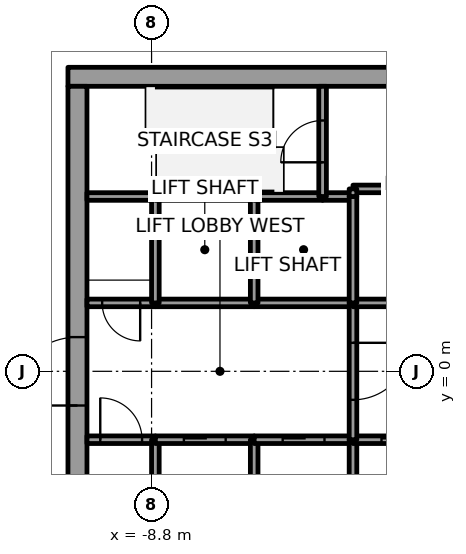
"""IFC4 building model, lengths in metres.
Left out: names, types, materials, properties, quantities, classifications, styles, units other than length and angle.
Written with IfcOpenShell. Run it as: python <this file> out.ifc"""

import sys

from ifc_helpers import new_model, si_unit, direction, frame, frame_2d, origin, place, context, subcontext, project, spatial, rectangle, extrude, element, fill, save


model = new_model("IFC4")
c1 = context("Model", 3, precision=1e-05, world=origin(), true_north=direction((0.0, 1.0)))
c2 = subcontext(c1, "Body", "Model", "MODEL_VIEW")
j1 = project(units=[si_unit("LENGTHUNIT", "METRE"), si_unit("PLANEANGLEUNIT", "RADIAN")], contexts=[c1])
p1 = place(None, origin())
s1 = spatial("IfcSite", under=j1, at=p1, CompositionType="ELEMENT")
p2 = place(p1, origin())
s2 = spatial("IfcBuilding", under=s1, at=p2, CompositionType="ELEMENT")
p3 = place(p2, frame((0.0, 0.0, 177.8)))
s3 = spatial("IfcBuildingStorey", under=s2, at=p3, CompositionType="ELEMENT", Elevation=177.8)
p4 = place(p3, frame((-11.0, 7.75, 0.0), z_axis=(0.0, 0.0, 1.0), x_axis=(1.0, 0.0, 0.0)))
e1 = element("IfcWall", 1, at=p4, inside=s3, PredefinedType="SHEAR", context=c2, shape_type="SweptSolid", body=[
    extrude(rectangle(XDim=22.0, YDim=0.5, at=frame_2d((11.0, 0.0))), origin(), (0.0, 0.0, 1.0), 4.0),
])
p5 = place(p4, frame((10.45, 0.0, 0.0)))
e2 = element("IfcOpeningElement", 2, at=p5, cuts=e1, PredefinedType="OPENING", context=c2, shape_type="SweptSolid", body=[
    extrude(rectangle(XDim=1.1, YDim=2.1, at=frame_2d((0.55, 1.05))), frame((0.0, 0.25, 0.0), z_axis=(0.0, -1.0, 0.0), x_axis=(1.0, 0.0, 0.0)), (0.0, 0.0, 1.0), 0.5),
])
p6 = place(p3, frame((-10.75, -7.5, 0.0), z_axis=(0.0, 0.0, 1.0), x_axis=(0.0, 1.0, 0.0)))
e3 = element("IfcWall", 3, at=p6, inside=s3, PredefinedType="SHEAR", context=c2, shape_type="SweptSolid", body=[
    extrude(rectangle(XDim=15.0, YDim=0.5, at=frame_2d((7.5, 0.0))), origin(), (0.0, 0.0, 1.0), 4.0),
])
p7 = place(p6, frame((6.6, 0.0, 0.0)))
e4 = element("IfcOpeningElement", 4, at=p7, cuts=e3, PredefinedType="OPENING", context=c2, shape_type="SweptSolid", body=[
    extrude(rectangle(XDim=1.8, YDim=2.1, at=frame_2d((0.9, 1.05))), frame((0.0, 0.25, 0.0), z_axis=(0.0, -1.0, 0.0), x_axis=(1.0, 0.0, 0.0)), (0.0, 0.0, 1.0), 0.5),
])
p8 = place(p3, frame((-10.5, -1.8, 0.0), z_axis=(0.0, 0.0, 1.0), x_axis=(1.0, 0.0, 0.0)))
e5 = element("IfcWall", 5, at=p8, inside=s3, PredefinedType="SOLIDWALL", context=c2, shape_type="SweptSolid", body=[
    extrude(rectangle(XDim=1.8, YDim=0.2, at=frame_2d((0.9, 0.0))), origin(), (0.0, 0.0, 1.0), 3.85),
])
p9 = place(p8, frame((0.35, 0.0, 0.0)))
e6 = element("IfcOpeningElement", 6, at=p9, cuts=e5, PredefinedType="OPENING", context=c2, shape_type="SweptSolid", body=[
    extrude(rectangle(XDim=1.1, YDim=2.1, at=frame_2d((0.55, 1.05))), frame((0.0, 0.1, 0.0), z_axis=(0.0, -1.0, 0.0), x_axis=(1.0, 0.0, 0.0)), (0.0, 0.0, 1.0), 0.2),
])
p10 = place(p3, frame((-8.7, 1.8, 0.0), z_axis=(0.0, 0.0, 1.0), x_axis=(-1.0, 0.0, 0.0)))
e7 = element("IfcWall", 7, at=p10, inside=s3, PredefinedType="SOLIDWALL", context=c2, shape_type="SweptSolid", body=[
    extrude(rectangle(XDim=1.8, YDim=0.2, at=frame_2d((0.9, 0.0))), origin(), (0.0, 0.0, 1.0), 3.85),
])
p11 = place(p10, frame((0.4, 0.0, 0.0)))
e8 = element("IfcOpeningElement", 8, at=p11, cuts=e7, PredefinedType="OPENING", context=c2, shape_type="SweptSolid", body=[
    extrude(rectangle(XDim=1.0, YDim=2.1, at=frame_2d((0.5, 1.05))), frame((0.0, 0.1, 0.0), z_axis=(0.0, -1.0, 0.0), x_axis=(1.0, 0.0, 0.0)), (0.0, 0.0, 1.0), 0.2),
])
p12 = place(p3, frame((-8.7, 4.6, 0.0), z_axis=(0.0, 0.0, 1.0), x_axis=(-1.0, 0.0, 0.0)))
e9 = element("IfcWall", 9, at=p12, inside=s3, PredefinedType="SOLIDWALL", context=c2, shape_type="SweptSolid", body=[
    extrude(rectangle(XDim=1.8, YDim=0.2, at=frame_2d((0.9, 0.0))), origin(), (0.0, 0.0, 1.0), 3.85),
])
p13 = place(p3, frame((-8.7, -4.6, 0.0), z_axis=(0.0, 0.0, 1.0), x_axis=(0.0, 1.0, 0.0)))
e10 = element("IfcWall", 10, at=p13, inside=s3, PredefinedType="SOLIDWALL", context=c2, shape_type="SweptSolid", body=[
    extrude(rectangle(XDim=2.8, YDim=0.2, at=frame_2d((1.4, 0.0))), origin(), (0.0, 0.0, 1.0), 3.85),
])
p14 = place(p3, frame((-8.7, -1.8, 0.0), z_axis=(0.0, 0.0, 1.0), x_axis=(1.0, 0.0, 0.0)))
e11 = element("IfcWall", 11, at=p14, inside=s3, PredefinedType="SOLIDWALL", context=c2, shape_type="SweptSolid", body=[
    extrude(rectangle(XDim=2.6, YDim=0.2, at=frame_2d((1.3, 0.0))), origin(), (0.0, 0.0, 1.0), 3.85),
])
p15 = place(p14, frame((0.75, 0.0, 0.0)))
e12 = element("IfcOpeningElement", 12, at=p15, cuts=e11, PredefinedType="OPENING", context=c2, shape_type="SweptSolid", body=[
    extrude(rectangle(XDim=1.1, YDim=2.1, at=frame_2d((0.55, 1.05))), frame((0.0, 0.1, 0.0), z_axis=(0.0, -1.0, 0.0), x_axis=(1.0, 0.0, 0.0)), (0.0, 0.0, 1.0), 0.2),
])
p16 = place(p3, frame((-6.1, 1.8, 0.0), z_axis=(0.0, 0.0, 1.0), x_axis=(-1.0, 0.0, 0.0)))
e13 = element("IfcWall", 13, at=p16, inside=s3, PredefinedType="SOLIDWALL", context=c2, shape_type="SweptSolid", body=[
    extrude(rectangle(XDim=2.6, YDim=0.2, at=frame_2d((1.3, 0.0))), origin(), (0.0, 0.0, 1.0), 3.85),
])
p17 = place(p3, frame((-8.7, 1.8, 0.0), z_axis=(0.0, 0.0, 1.0), x_axis=(0.0, 1.0, 0.0)))
e14 = element("IfcWall", 14, at=p17, inside=s3, PredefinedType="SOLIDWALL", context=c2, shape_type="SweptSolid", body=[
    extrude(rectangle(XDim=2.8, YDim=0.2, at=frame_2d((1.4, 0.0))), origin(), (0.0, 0.0, 1.0), 3.85),
])
p18 = place(p3, frame((-6.1, 4.6, 0.0), z_axis=(0.0, 0.0, 1.0), x_axis=(-1.0, 0.0, 0.0)))
e15 = element("IfcWall", 15, at=p18, inside=s3, PredefinedType="SOLIDWALL", context=c2, shape_type="SweptSolid", body=[
    extrude(rectangle(XDim=2.6, YDim=0.2, at=frame_2d((1.3, 0.0))), origin(), (0.0, 0.0, 1.0), 3.85),
])
p19 = place(p3, frame((-6.1, -4.6, 0.0), z_axis=(0.0, 0.0, 1.0), x_axis=(0.0, 1.0, 0.0)))
e16 = element("IfcWall", 16, at=p19, inside=s3, PredefinedType="SOLIDWALL", context=c2, shape_type="SweptSolid", body=[
    extrude(rectangle(XDim=2.8, YDim=0.2, at=frame_2d((1.4, 0.0))), origin(), (0.0, 0.0, 1.0), 3.85),
])
p20 = place(p3, frame((-6.1, -1.8, 0.0), z_axis=(0.0, 0.0, 1.0), x_axis=(1.0, 0.0, 0.0)))
e17 = element("IfcWall", 17, at=p20, inside=s3, PredefinedType="SOLIDWALL", context=c2, shape_type="SweptSolid", body=[
    extrude(rectangle(XDim=2.6, YDim=0.2, at=frame_2d((1.3, 0.0))), origin(), (0.0, 0.0, 1.0), 3.85),
])
p21 = place(p20, frame((0.75, 0.0, 0.0)))
e18 = element("IfcOpeningElement", 18, at=p21, cuts=e17, PredefinedType="OPENING", context=c2, shape_type="SweptSolid", body=[
    extrude(rectangle(XDim=1.1, YDim=2.1, at=frame_2d((0.55, 1.05))), frame((0.0, 0.1, 0.0), z_axis=(0.0, -1.0, 0.0), x_axis=(1.0, 0.0, 0.0)), (0.0, 0.0, 1.0), 0.2),
])
p22 = place(p3, frame((-3.5, 1.8, 0.0), z_axis=(0.0, 0.0, 1.0), x_axis=(-1.0, 0.0, 0.0)))
e19 = element("IfcWall", 19, at=p22, inside=s3, PredefinedType="SOLIDWALL", context=c2, shape_type="SweptSolid", body=[
    extrude(rectangle(XDim=2.6, YDim=0.2, at=frame_2d((1.3, 0.0))), origin(), (0.0, 0.0, 1.0), 3.85),
])
p23 = place(p3, frame((-6.1, 1.8, 0.0), z_axis=(0.0, 0.0, 1.0), x_axis=(0.0, 1.0, 0.0)))
e20 = element("IfcWall", 20, at=p23, inside=s3, PredefinedType="SOLIDWALL", context=c2, shape_type="SweptSolid", body=[
    extrude(rectangle(XDim=2.8, YDim=0.2, at=frame_2d((1.4, 0.0))), origin(), (0.0, 0.0, 1.0), 3.85),
])
p24 = place(p3, frame((-4.3, 4.6, 0.0), z_axis=(0.0, 0.0, 1.0), x_axis=(-1.0, 0.0, 0.0)))
e21 = element("IfcWall", 21, at=p24, inside=s3, PredefinedType="SOLIDWALL", context=c2, shape_type="SweptSolid", body=[
    extrude(rectangle(XDim=1.8, YDim=0.2, at=frame_2d((0.9, 0.0))), origin(), (0.0, 0.0, 1.0), 3.85),
])
p25 = place(p3, frame((-3.5, 4.6, 0.0), z_axis=(0.0, 0.0, 1.0), x_axis=(-1.0, 0.0, 0.0)))
e22 = element("IfcWall", 22, at=p25, inside=s3, PredefinedType="SOLIDWALL", context=c2, shape_type="SweptSolid", body=[
    extrude(rectangle(XDim=0.8, YDim=0.2, at=frame_2d((0.4, 0.0))), origin(), (0.0, 0.0, 1.0), 3.85),
])
p26 = place(p3, frame((-4.3, 4.6, 0.0), z_axis=(0.0, 0.0, 1.0), x_axis=(0.0, 1.0, 0.0)))
e23 = element("IfcWall", 23, at=p26, inside=s3, PredefinedType="SOLIDWALL", context=c2, shape_type="SweptSolid", body=[
    extrude(rectangle(XDim=2.9, YDim=0.2, at=frame_2d((1.45, 0.0))), origin(), (0.0, 0.0, 1.0), 3.85),
])
p27 = place(p26, frame((0.9, 0.0, 0.0)))
e24 = element("IfcOpeningElement", 24, at=p27, cuts=e23, PredefinedType="OPENING", context=c2, shape_type="SweptSolid", body=[
    extrude(rectangle(XDim=1.1, YDim=2.1, at=frame_2d((0.55, 1.05))), frame((0.0, 0.1, 0.0), z_axis=(0.0, -1.0, 0.0), x_axis=(1.0, 0.0, 0.0)), (0.0, 0.0, 1.0), 0.2),
])
p28 = place(p3, frame((-3.5, -4.6, 0.0), z_axis=(0.0, 0.0, 1.0), x_axis=(0.0, 1.0, 0.0)))
e25 = element("IfcWall", 25, at=p28, inside=s3, PredefinedType="SOLIDWALL", context=c2, shape_type="SweptSolid", body=[
    extrude(rectangle(XDim=2.8, YDim=0.2, at=frame_2d((1.4, 0.0))), origin(), (0.0, 0.0, 1.0), 3.85),
])
p29 = place(p3, frame((-3.5, -1.8, 0.0), z_axis=(0.0, 0.0, 1.0), x_axis=(1.0, 0.0, 0.0)))
e26 = element("IfcWall", 26, at=p29, inside=s3, PredefinedType="SOLIDWALL", context=c2, shape_type="SweptSolid", body=[
    extrude(rectangle(XDim=2.6, YDim=0.2, at=frame_2d((1.3, 0.0))), origin(), (0.0, 0.0, 1.0), 3.85),
])
p30 = place(p29, frame((0.75, 0.0, 0.0)))
e27 = element("IfcOpeningElement", 27, at=p30, cuts=e26, PredefinedType="OPENING", context=c2, shape_type="SweptSolid", body=[
    extrude(rectangle(XDim=1.1, YDim=2.1, at=frame_2d((0.55, 1.05))), frame((0.0, 0.1, 0.0), z_axis=(0.0, -1.0, 0.0), x_axis=(1.0, 0.0, 0.0)), (0.0, 0.0, 1.0), 0.2),
])
p31 = place(p3, frame((-3.5, 1.8, 0.0), z_axis=(0.0, 0.0, 1.0), x_axis=(0.0, -1.0, 0.0)))
e28 = element("IfcWall", 28, at=p31, inside=s3, PredefinedType="SOLIDWALL", context=c2, shape_type="SweptSolid", body=[
    extrude(rectangle(XDim=3.6, YDim=0.2, at=frame_2d((1.8, 0.0))), origin(), (0.0, 0.0, 1.0), 3.85),
])
p32 = place(p31, frame((1.05, 0.0, 0.0)))
e29 = element("IfcOpeningElement", 29, at=p32, cuts=e28, PredefinedType="OPENING", context=c2, shape_type="SweptSolid", body=[
    extrude(rectangle(XDim=1.5, YDim=2.1, at=frame_2d((0.75, 1.05))), frame((0.0, 0.1, 0.0), z_axis=(0.0, -1.0, 0.0), x_axis=(1.0, 0.0, 0.0)), (0.0, 0.0, 1.0), 0.2),
])
p33 = place(p3, frame((-0.9, 1.8, 0.0), z_axis=(0.0, 0.0, 1.0), x_axis=(-1.0, 0.0, 0.0)))
e30 = element("IfcWall", 30, at=p33, inside=s3, PredefinedType="SOLIDWALL", context=c2, shape_type="SweptSolid", body=[
    extrude(rectangle(XDim=2.6, YDim=0.2, at=frame_2d((1.3, 0.0))), origin(), (0.0, 0.0, 1.0), 3.85),
])
p34 = place(p3, frame((-3.5, 4.6, 0.0), z_axis=(0.0, 0.0, 1.0), x_axis=(0.0, -1.0, 0.0)))
e31 = element("IfcWall", 31, at=p34, inside=s3, PredefinedType="SOLIDWALL", context=c2, shape_type="SweptSolid", body=[
    extrude(rectangle(XDim=2.8, YDim=0.2, at=frame_2d((1.4, 0.0))), origin(), (0.0, 0.0, 1.0), 3.85),
])
p35 = place(p3, frame((-0.9, 4.8, 0.0), z_axis=(0.0, 0.0, 1.0), x_axis=(-1.0, 0.0, 0.0)))
e32 = element("IfcWall", 32, at=p35, inside=s3, PredefinedType="SOLIDWALL", context=c2, shape_type="SweptSolid", body=[
    extrude(rectangle(XDim=2.6, YDim=0.2, at=frame_2d((1.3, 0.0))), origin(), (0.0, 0.0, 1.0), 3.85),
])
p36 = place(p3, frame((-3.5, 4.8, 0.0), z_axis=(0.0, 0.0, 1.0), x_axis=(0.0, -1.0, 0.0)))
e33 = element("IfcWall", 33, at=p36, inside=s3, PredefinedType="SOLIDWALL", context=c2, shape_type="SweptSolid", body=[
    extrude(rectangle(XDim=0.2, YDim=0.2, at=frame_2d((0.1, 0.0))), origin(), (0.0, 0.0, 1.0), 3.85),
])
p37 = place(p15, origin())
e34 = element("IfcDoor", 34, at=p37, inside=s3, OperationType="SLIDING_TO_LEFT", PredefinedType="DOOR", context=c2, shape_type="SweptSolid", body=[
    extrude(rectangle(XDim=1.1, YDim=2.1, at=frame_2d((0.55, 1.05))), frame((0.0, 0.025, 0.0), z_axis=(0.0, -1.0, 0.0), x_axis=(1.0, 0.0, 0.0)), (0.0, 0.0, 1.0), 0.05),
])
fill(e12, e34)
p38 = place(p21, origin())
e35 = element("IfcDoor", 35, at=p38, inside=s3, OperationType="SLIDING_TO_LEFT", PredefinedType="DOOR", context=c2, shape_type="SweptSolid", body=[
    extrude(rectangle(XDim=1.1, YDim=2.1, at=frame_2d((0.55, 1.05))), frame((0.0, 0.025, 0.0), z_axis=(0.0, -1.0, 0.0), x_axis=(1.0, 0.0, 0.0)), (0.0, 0.0, 1.0), 0.05),
])
fill(e18, e35)
p39 = place(p30, origin())
e36 = element("IfcDoor", 36, at=p39, inside=s3, OperationType="SLIDING_TO_LEFT", PredefinedType="DOOR", context=c2, shape_type="SweptSolid", body=[
    extrude(rectangle(XDim=1.1, YDim=2.1, at=frame_2d((0.55, 1.05))), frame((0.0, 0.025, 0.0), z_axis=(0.0, -1.0, 0.0), x_axis=(1.0, 0.0, 0.0)), (0.0, 0.0, 1.0), 0.05),
])
fill(e27, e36)
p40 = place(p32, origin())
e37 = element("IfcDoor", 37, at=p40, inside=s3, OperationType="DOUBLE_DOOR_SINGLE_SWING", PredefinedType="DOOR", context=c2, shape_type="SweptSolid", body=[
    extrude(rectangle(XDim=1.5, YDim=2.1, at=frame_2d((0.75, 1.05))), frame((0.0, 0.025, 0.0), z_axis=(0.0, -1.0, 0.0), x_axis=(1.0, 0.0, 0.0)), (0.0, 0.0, 1.0), 0.05),
])
fill(e29, e37)
p41 = place(p9, origin())
e38 = element("IfcDoor", 38, at=p41, inside=s3, OperationType="SINGLE_SWING_LEFT", PredefinedType="DOOR", context=c2, shape_type="SweptSolid", body=[
    extrude(rectangle(XDim=1.1, YDim=2.1, at=frame_2d((0.55, 1.05))), frame((0.0, 0.025, 0.0), z_axis=(0.0, -1.0, 0.0), x_axis=(1.0, 0.0, 0.0)), (0.0, 0.0, 1.0), 0.05),
])
fill(e6, e38)
p42 = place(p11, origin())
e39 = element("IfcDoor", 39, at=p42, inside=s3, OperationType="SINGLE_SWING_LEFT", PredefinedType="DOOR", context=c2, shape_type="SweptSolid", body=[
    extrude(rectangle(XDim=1.0, YDim=2.1, at=frame_2d((0.5, 1.05))), frame((0.0, 0.025, 0.0), z_axis=(0.0, -1.0, 0.0), x_axis=(1.0, 0.0, 0.0)), (0.0, 0.0, 1.0), 0.05),
])
fill(e8, e39)
p43 = place(p27, origin())
e40 = element("IfcDoor", 40, at=p43, inside=s3, OperationType="SINGLE_SWING_LEFT", PredefinedType="DOOR", context=c2, shape_type="SweptSolid", body=[
    extrude(rectangle(XDim=1.1, YDim=2.1, at=frame_2d((0.55, 1.05))), frame((0.0, 0.025, 0.0), z_axis=(0.0, -1.0, 0.0), x_axis=(1.0, 0.0, 0.0)), (0.0, 0.0, 1.0), 0.05),
])
fill(e24, e40)
p44 = place(p7, origin())
e41 = element("IfcDoor", 41, at=p44, inside=s3, OperationType="DOUBLE_DOOR_SINGLE_SWING", PredefinedType="DOOR", context=c2, shape_type="SweptSolid", body=[
    extrude(rectangle(XDim=1.8, YDim=2.1, at=frame_2d((0.9, 1.05))), frame((0.0, 0.025, 0.0), z_axis=(0.0, -1.0, 0.0), x_axis=(1.0, 0.0, 0.0)), (0.0, 0.0, 1.0), 0.05),
])
fill(e4, e41)
save(model, sys.argv[1])
